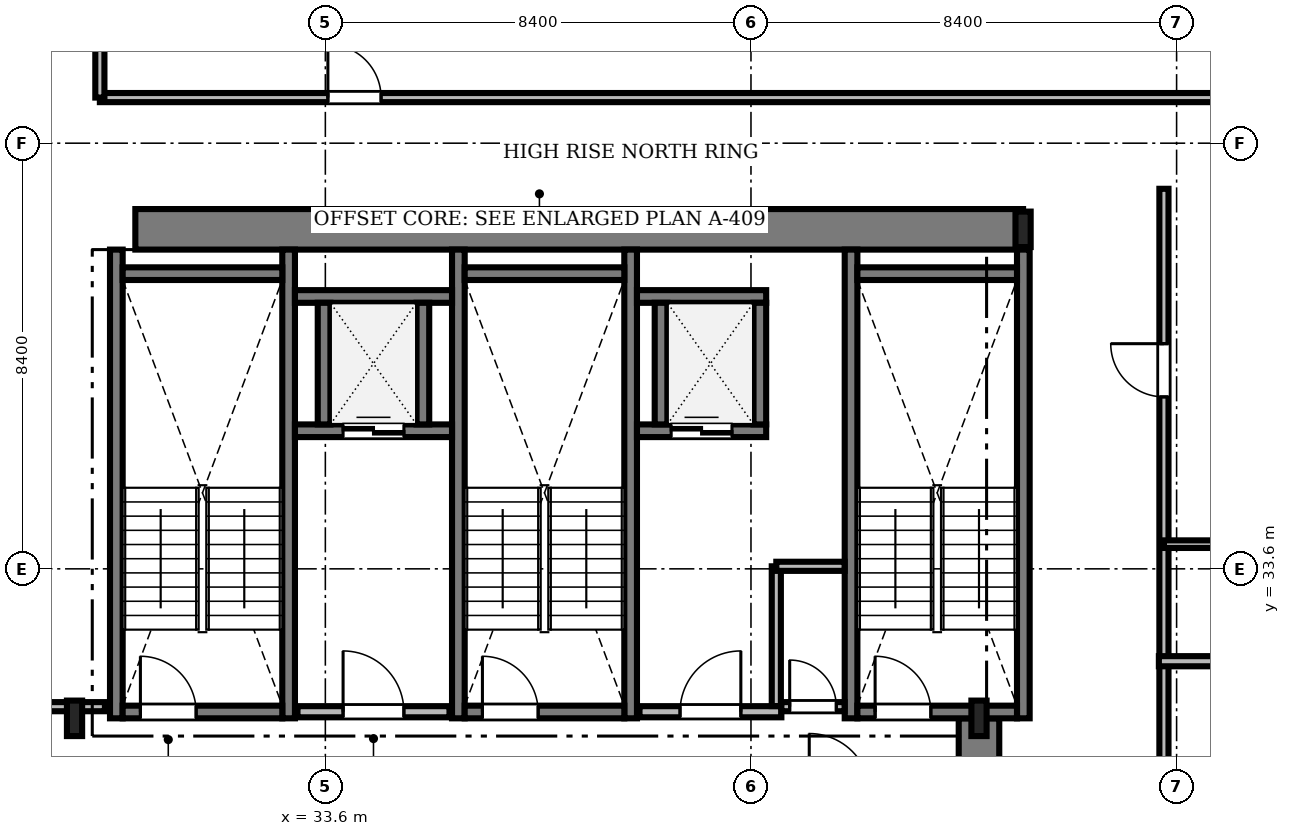
"""IFC4 building model, lengths in metres.
Left out: names, types, materials, properties, quantities, classifications, styles, units other than length and angle.
Written with IfcOpenShell. Run it as: python <this file> out.ifc"""

import sys

from ifc_helpers import new_model, si_unit, direction, frame, frame_2d, origin, origin_2d, place, context, subcontext, project, spatial, rectangle, i_section, extrude, source, transform, mapped, element, fill, save


model = new_model("IFC4")
c1 = context("Model", 3, precision=1e-05, world=origin(), true_north=direction((0.0, 1.0)))
c2 = subcontext(c1, "Body", "Model", "MODEL_VIEW")
j1 = project(units=[si_unit("LENGTHUNIT", "METRE"), si_unit("PLANEANGLEUNIT", "RADIAN")], contexts=[c1])
p1 = place(None, origin())
s1 = spatial("IfcSite", under=j1, at=p1, CompositionType="ELEMENT")
p2 = place(p1, origin())
s2 = spatial("IfcBuilding", under=s1, at=p2, CompositionType="ELEMENT")
p3 = place(p2, frame((0.0, 0.0, 233.55)))
s3 = spatial("IfcBuildingStorey", under=s2, at=p3, CompositionType="ELEMENT", Elevation=233.55)
m1 = source(origin(), c2, "Body", "SweptSolid", [
    extrude(rectangle(XDim=17.52, YDim=0.8, at=frame_2d((8.76, 0.0))), origin(), (0.0, 0.0, 1.0), 3.1),
])
p4 = place(p3, frame((29.85, 40.3, 0.0), z_axis=(0.0, 0.0, 1.0), x_axis=(1.0, 0.0, 0.0)))
e1 = element("IfcWall", 1, at=p4, inside=s3, PredefinedType="SHEAR", context=c2, shape_type="MappedRepresentation", body=[
    mapped(m1, transform((0.0, 0.0, 0.0), scale=1.0)),
])
m2 = source(origin(), c2, "Body", "SweptSolid", [
    extrude(rectangle(XDim=13.15, YDim=0.8, at=frame_2d((6.575, 0.0))), origin(), (0.0, 0.0, 1.0), 3.1),
])
p5 = place(p3, frame((46.5, 17.5, 0.0), z_axis=(0.0, 0.0, 1.0), x_axis=(0.0, 1.0, 0.0)))
e2 = element("IfcWall", 2, at=p5, inside=s3, PredefinedType="SHEAR", context=c2, shape_type="MappedRepresentation", body=[
    mapped(m2, transform((0.0, 0.0, 0.0), scale=1.0)),
])
m3 = source(origin(), c2, "Body", "SweptSolid", [
    extrude(i_section(OverallWidth=0.3, OverallDepth=0.7, WebThickness=0.017, FlangeThickness=0.032, FilletRadius=0.027, at=origin_2d()), origin(), (0.0, 0.0, 1.0), 3.1),
])
for number, where, z_axis, x_axis in (
    (3, (28.65, 30.65, 0.0), (0.0, 0.0, 1.0), (1.0, 0.0, 0.0)),
    (4, (46.5, 30.65, 0.0), (0.0, 0.0, 1.0), (1.0, 0.0, 0.0)),
    (5, (47.37, 40.3, 0.0), (0.0, 0.0, 1.0), (1.0, 0.0, 0.0)),
):
    element("IfcColumn", number, at=place(p3, frame(where, z_axis=z_axis, x_axis=x_axis)), inside=s3, PredefinedType="COLUMN", context=c2, shape_type="MappedRepresentation", body=[
        mapped(m3, transform((0.0, 0.0, 0.0), scale=1.0)),
    ])
m4 = source(origin(), c2, "Body", "SweptSolid", [
    extrude(rectangle(XDim=9.25, YDim=0.25, at=frame_2d((4.625, 0.0))), origin(), (0.0, 0.0, 1.0), 3.55),
])
for number, where, z_axis, x_axis in (
    (6, (29.475, 30.65, 0.0), (0.0, 0.0, 1.0), (0.0, 1.0, 0.0)),
    (7, (32.875, 30.65, 0.0), (0.0, 0.0, 1.0), (0.0, 1.0, 0.0)),
):
    element("IfcWall", number, at=place(p3, frame(where, z_axis=z_axis, x_axis=x_axis)), inside=s3, PredefinedType="SOLIDWALL", context=c2, shape_type="MappedRepresentation", body=[
        mapped(m4, transform((0.0, 0.0, 0.0), scale=1.0)),
    ])
m5 = source(origin(), c2, "Body", "SweptSolid", [
    extrude(rectangle(XDim=3.15, YDim=0.25, at=frame_2d((1.575, 0.0))), origin(), (0.0, 0.0, 1.0), 3.55),
])
p6 = place(p3, frame((29.6, 39.425, 0.0), z_axis=(0.0, 0.0, 1.0), x_axis=(1.0, 0.0, 0.0)))
e8 = element("IfcWall", 8, at=p6, inside=s3, PredefinedType="SOLIDWALL", context=c2, shape_type="MappedRepresentation", body=[
    mapped(m5, transform((0.0, 0.0, 0.0), scale=1.0)),
])
p7 = place(p3, frame((29.6, 30.775, 0.0), z_axis=(0.0, 0.0, 1.0), x_axis=(1.0, 0.0, 0.0)))
e9 = element("IfcWall", 9, at=p7, inside=s3, PredefinedType="SOLIDWALL", context=c2, shape_type="MappedRepresentation", body=[
    mapped(m5, transform((0.0, 0.0, 0.0), scale=1.0)),
])
m6 = source(origin(), c2, "Body", "SweptSolid", [
    extrude(rectangle(XDim=1.1, YDim=2.2, at=frame_2d((0.55, 1.1))), frame((0.0, 0.135, 0.0), z_axis=(0.0, -1.0, 0.0), x_axis=(1.0, 0.0, 0.0)), (0.0, 0.0, 1.0), 0.27),
])
p8 = place(p7, frame((0.35, 0.0, 0.0)))
e10 = element("IfcOpeningElement", 10, at=p8, cuts=e9, PredefinedType="OPENING", context=c2, shape_type="MappedRepresentation", body=[
    mapped(m6, transform((0.0, 0.0, 0.0), scale=1.0)),
])
for number, where, z_axis, x_axis in (
    (11, (36.225, 30.65, 0.0), (0.0, 0.0, 1.0), (0.0, 1.0, 0.0)),
    (12, (39.625, 30.65, 0.0), (0.0, 0.0, 1.0), (0.0, 1.0, 0.0)),
):
    element("IfcWall", number, at=place(p3, frame(where, z_axis=z_axis, x_axis=x_axis)), inside=s3, PredefinedType="SOLIDWALL", context=c2, shape_type="MappedRepresentation", body=[
        mapped(m4, transform((0.0, 0.0, 0.0), scale=1.0)),
    ])
p9 = place(p3, frame((36.35, 39.425, 0.0), z_axis=(0.0, 0.0, 1.0), x_axis=(1.0, 0.0, 0.0)))
e13 = element("IfcWall", 13, at=p9, inside=s3, PredefinedType="SOLIDWALL", context=c2, shape_type="MappedRepresentation", body=[
    mapped(m5, transform((0.0, 0.0, 0.0), scale=1.0)),
])
p10 = place(p3, frame((36.35, 30.775, 0.0), z_axis=(0.0, 0.0, 1.0), x_axis=(1.0, 0.0, 0.0)))
e14 = element("IfcWall", 14, at=p10, inside=s3, PredefinedType="SOLIDWALL", context=c2, shape_type="MappedRepresentation", body=[
    mapped(m5, transform((0.0, 0.0, 0.0), scale=1.0)),
])
p11 = place(p10, frame((0.35, 0.0, 0.0)))
e15 = element("IfcOpeningElement", 15, at=p11, cuts=e14, PredefinedType="OPENING", context=c2, shape_type="MappedRepresentation", body=[
    mapped(m6, transform((0.0, 0.0, 0.0), scale=1.0)),
])
for number, where, z_axis, x_axis in (
    (16, (43.975, 30.65, 0.0), (0.0, 0.0, 1.0), (0.0, 1.0, 0.0)),
    (17, (47.375, 30.65, 0.0), (0.0, 0.0, 1.0), (0.0, 1.0, 0.0)),
):
    element("IfcWall", number, at=place(p3, frame(where, z_axis=z_axis, x_axis=x_axis)), inside=s3, PredefinedType="SOLIDWALL", context=c2, shape_type="MappedRepresentation", body=[
        mapped(m4, transform((0.0, 0.0, 0.0), scale=1.0)),
    ])
p12 = place(p3, frame((44.1, 39.425, 0.0), z_axis=(0.0, 0.0, 1.0), x_axis=(1.0, 0.0, 0.0)))
e18 = element("IfcWall", 18, at=p12, inside=s3, PredefinedType="SOLIDWALL", context=c2, shape_type="MappedRepresentation", body=[
    mapped(m5, transform((0.0, 0.0, 0.0), scale=1.0)),
])
p13 = place(p3, frame((44.1, 30.775, 0.0), z_axis=(0.0, 0.0, 1.0), x_axis=(1.0, 0.0, 0.0)))
e19 = element("IfcWall", 19, at=p13, inside=s3, PredefinedType="SOLIDWALL", context=c2, shape_type="MappedRepresentation", body=[
    mapped(m5, transform((0.0, 0.0, 0.0), scale=1.0)),
])
p14 = place(p13, frame((0.35, 0.0, 0.0)))
e20 = element("IfcOpeningElement", 20, at=p14, cuts=e19, PredefinedType="OPENING", context=c2, shape_type="MappedRepresentation", body=[
    mapped(m6, transform((0.0, 0.0, 0.0), scale=1.0)),
])
m7 = source(origin(), c2, "Body", "SweptSolid", [
    extrude(rectangle(XDim=3.0, YDim=0.22, at=frame_2d((1.5, 0.0))), origin(), (0.0, 0.0, 1.0), 3.1),
])
p15 = place(p3, frame((33.05, 30.78, 0.0), z_axis=(0.0, 0.0, 1.0), x_axis=(1.0, 0.0, 0.0)))
e21 = element("IfcWall", 21, at=p15, inside=s3, PredefinedType="SOLIDWALL", context=c2, shape_type="MappedRepresentation", body=[
    mapped(m7, transform((0.0, 0.0, 0.0), scale=1.0)),
])
m8 = source(origin(), c2, "Body", "SweptSolid", [
    extrude(rectangle(XDim=1.2, YDim=2.2, at=frame_2d((0.6, 1.1))), frame((0.0, 0.12, 0.0), z_axis=(0.0, -1.0, 0.0), x_axis=(1.0, 0.0, 0.0)), (0.0, 0.0, 1.0), 0.24),
])
p16 = place(p15, frame((0.9, 0.0, 0.0)))
e22 = element("IfcOpeningElement", 22, at=p16, cuts=e21, PredefinedType="OPENING", context=c2, shape_type="MappedRepresentation", body=[
    mapped(m8, transform((0.0, 0.0, 0.0), scale=1.0)),
])
m9 = source(origin(), c2, "Body", "SweptSolid", [
    extrude(rectangle(XDim=2.8, YDim=0.22, at=frame_2d((1.4, 0.0))), origin(), (0.0, 0.0, 1.0), 3.1),
])
p17 = place(p3, frame((39.8, 30.78, 0.0), z_axis=(0.0, 0.0, 1.0), x_axis=(1.0, 0.0, 0.0)))
e23 = element("IfcWall", 23, at=p17, inside=s3, PredefinedType="SOLIDWALL", context=c2, shape_type="MappedRepresentation", body=[
    mapped(m9, transform((0.0, 0.0, 0.0), scale=1.0)),
])
p18 = place(p17, frame((0.8, 0.0, 0.0)))
e24 = element("IfcOpeningElement", 24, at=p18, cuts=e23, PredefinedType="OPENING", context=c2, shape_type="MappedRepresentation", body=[
    mapped(m8, transform((0.0, 0.0, 0.0), scale=1.0)),
])
m10 = source(origin(), c2, "Body", "SweptSolid", [
    extrude(rectangle(XDim=3.1, YDim=0.25, at=frame_2d((1.55, 0.0))), origin(), (0.0, 0.0, 1.0), 3.1),
])
p19 = place(p3, frame((33.0, 36.325, 0.0), z_axis=(0.0, 0.0, 1.0), x_axis=(1.0, 0.0, 0.0)))
e25 = element("IfcWall", 25, at=p19, inside=s3, PredefinedType="SOLIDWALL", context=c2, shape_type="MappedRepresentation", body=[
    mapped(m10, transform((0.0, 0.0, 0.0), scale=1.0)),
])
m11 = source(origin(), c2, "Body", "SweptSolid", [
    extrude(rectangle(XDim=1.2, YDim=2.25, at=frame_2d((0.6, 1.125))), frame((0.0, 0.135, 0.0), z_axis=(0.0, -1.0, 0.0), x_axis=(1.0, 0.0, 0.0)), (0.0, 0.0, 1.0), 0.27),
])
p20 = place(p19, frame((0.95, 0.0, 0.0)))
e26 = element("IfcOpeningElement", 26, at=p20, cuts=e25, PredefinedType="OPENING", context=c2, shape_type="MappedRepresentation", body=[
    mapped(m11, transform((0.0, 0.0, 0.0), scale=1.0)),
])
p21 = place(p3, frame((33.0, 38.975, 0.0), z_axis=(0.0, 0.0, 1.0), x_axis=(1.0, 0.0, 0.0)))
e27 = element("IfcWall", 27, at=p21, inside=s3, PredefinedType="SOLIDWALL", context=c2, shape_type="MappedRepresentation", body=[
    mapped(m10, transform((0.0, 0.0, 0.0), scale=1.0)),
])
m12 = source(origin(), c2, "Body", "SweptSolid", [
    extrude(rectangle(XDim=2.4, YDim=0.25, at=frame_2d((1.2, 0.0))), origin(), (0.0, 0.0, 1.0), 3.1),
])
for number, where, z_axis, x_axis in (
    (28, (33.575, 36.45, 0.0), (0.0, 0.0, 1.0), (0.0, 1.0, 0.0)),
    (29, (35.525, 36.45, 0.0), (0.0, 0.0, 1.0), (0.0, 1.0, 0.0)),
):
    element("IfcWall", number, at=place(p3, frame(where, z_axis=z_axis, x_axis=x_axis)), inside=s3, PredefinedType="SOLIDWALL", context=c2, shape_type="MappedRepresentation", body=[
        mapped(m12, transform((0.0, 0.0, 0.0), scale=1.0)),
    ])
m13 = source(origin(), c2, "Body", "SweptSolid", [
    extrude(rectangle(XDim=2.55, YDim=0.25, at=frame_2d((1.275, 0.0))), origin(), (0.0, 0.0, 1.0), 3.1),
])
p22 = place(p3, frame((39.75, 36.325, 0.0), z_axis=(0.0, 0.0, 1.0), x_axis=(1.0, 0.0, 0.0)))
e30 = element("IfcWall", 30, at=p22, inside=s3, PredefinedType="SOLIDWALL", context=c2, shape_type="MappedRepresentation", body=[
    mapped(m13, transform((0.0, 0.0, 0.0), scale=1.0)),
])
p23 = place(p22, frame((0.675, 0.0, 0.0)))
e31 = element("IfcOpeningElement", 31, at=p23, cuts=e30, PredefinedType="OPENING", context=c2, shape_type="MappedRepresentation", body=[
    mapped(m11, transform((0.0, 0.0, 0.0), scale=1.0)),
])
p24 = place(p3, frame((39.75, 38.975, 0.0), z_axis=(0.0, 0.0, 1.0), x_axis=(1.0, 0.0, 0.0)))
e32 = element("IfcWall", 32, at=p24, inside=s3, PredefinedType="SOLIDWALL", context=c2, shape_type="MappedRepresentation", body=[
    mapped(m13, transform((0.0, 0.0, 0.0), scale=1.0)),
])
for number, where, z_axis, x_axis in (
    (33, (40.225, 36.45, 0.0), (0.0, 0.0, 1.0), (0.0, 1.0, 0.0)),
    (34, (42.175, 36.45, 0.0), (0.0, 0.0, 1.0), (0.0, 1.0, 0.0)),
):
    element("IfcWall", number, at=place(p3, frame(where, z_axis=z_axis, x_axis=x_axis)), inside=s3, PredefinedType="SOLIDWALL", context=c2, shape_type="MappedRepresentation", body=[
        mapped(m12, transform((0.0, 0.0, 0.0), scale=1.0)),
    ])
m14 = source(origin(), c2, "Body", "SweptSolid", [
    extrude(rectangle(XDim=28.428, YDim=0.18, at=frame_2d((14.214, 0.0))), origin(), (0.0, 0.0, 1.0), 2.376),
])
p25 = place(p3, frame((29.15, 42.9, 0.0), z_axis=(0.0, 0.0, 1.0), x_axis=(1.0, 0.0, 0.0)))
e35 = element("IfcWall", 35, at=p25, inside=s3, PredefinedType="PARTITIONING", context=c2, shape_type="MappedRepresentation", body=[
    mapped(m14, transform((0.0, 0.0, 0.0), scale=1.0)),
])
m15 = source(origin(), c2, "Body", "SweptSolid", [
    extrude(rectangle(XDim=1.05, YDim=2.2, at=frame_2d((0.525, 1.1))), frame((0.0, 0.1, 0.0), z_axis=(0.0, -1.0, 0.0), x_axis=(1.0, 0.0, 0.0)), (0.0, 0.0, 1.0), 0.2),
])
p26 = place(p25, frame((4.5, 0.0, 0.0)))
e36 = element("IfcOpeningElement", 36, at=p26, cuts=e35, PredefinedType="OPENING", context=c2, shape_type="MappedRepresentation", body=[
    mapped(m15, transform((0.0, 0.0, 0.0), scale=1.0)),
])
m16 = source(origin(), c2, "Body", "SweptSolid", [
    extrude(rectangle(XDim=27.53, YDim=0.18, at=frame_2d((13.765, 0.0))), origin(), (0.0, 0.0, 1.0), 2.542),
])
p27 = place(p3, frame((50.15, 13.57, 0.0), z_axis=(0.0, 0.0, 1.0), x_axis=(0.0, 1.0, 0.0)))
e37 = element("IfcWall", 37, at=p27, inside=s3, PredefinedType="PARTITIONING", context=c2, shape_type="MappedRepresentation", body=[
    mapped(m16, transform((0.0, 0.0, 0.0), scale=1.0)),
])
p28 = place(p27, frame((5.217, 0.0, 0.0)))
e38 = element("IfcOpeningElement", 38, at=p28, cuts=e37, PredefinedType="OPENING", context=c2, shape_type="MappedRepresentation", body=[
    mapped(m15, transform((0.0, 0.0, 0.0), scale=1.0)),
])
p29 = place(p27, frame((14.32, 0.0, 0.0)))
e39 = element("IfcOpeningElement", 39, at=p29, cuts=e37, PredefinedType="OPENING", context=c2, shape_type="MappedRepresentation", body=[
    mapped(m15, transform((0.0, 0.0, 0.0), scale=1.0)),
])
p30 = place(p27, frame((23.423, 0.0, 0.0)))
e40 = element("IfcOpeningElement", 40, at=p30, cuts=e37, PredefinedType="OPENING", context=c2, shape_type="MappedRepresentation", body=[
    mapped(m15, transform((0.0, 0.0, 0.0), scale=1.0)),
])
m17 = source(origin(), c2, "Body", "SweptSolid", [
    extrude(rectangle(XDim=17.828, YDim=0.18, at=frame_2d((8.914, 0.0))), origin(), (0.0, 0.0, 1.0), 2.376),
])
p31 = place(p3, frame((11.422, 30.88, 0.0), z_axis=(0.0, 0.0, 1.0), x_axis=(1.0, 0.0, 0.0)))
e41 = element("IfcWall", 41, at=p31, inside=s3, PredefinedType="PARTITIONING", context=c2, shape_type="MappedRepresentation", body=[
    mapped(m17, transform((0.0, 0.0, 0.0), scale=1.0)),
])
p32 = place(p31, frame((10.778, 0.0, 0.0)))
e42 = element("IfcOpeningElement", 42, at=p32, cuts=e41, PredefinedType="OPENING", context=c2, shape_type="MappedRepresentation", body=[
    mapped(m15, transform((0.0, 0.0, 0.0), scale=1.0)),
])
m18 = source(origin(), c2, "Body", "SweptSolid", [
    extrude(rectangle(XDim=1.248, YDim=0.18, at=frame_2d((0.624, 0.0))), origin(), (0.0, 0.0, 1.0), 3.1),
])
p33 = place(p3, frame((42.6, 30.88, 0.0), z_axis=(0.0, 0.0, 1.0), x_axis=(1.0, 0.0, 0.0)))
e43 = element("IfcWall", 43, at=p33, inside=s3, PredefinedType="PARTITIONING", context=c2, shape_type="MappedRepresentation", body=[
    mapped(m18, transform((0.0, 0.0, 0.0), scale=1.0)),
])
m19 = source(origin(), c2, "Body", "SweptSolid", [
    extrude(rectangle(XDim=0.92, YDim=2.1, at=frame_2d((0.46, 1.05))), frame((0.0, 0.1, 0.0), z_axis=(0.0, -1.0, 0.0), x_axis=(1.0, 0.0, 0.0)), (0.0, 0.0, 1.0), 0.2),
])
p34 = place(p33, frame((0.164, 0.0, 0.0)))
e44 = element("IfcOpeningElement", 44, at=p34, cuts=e43, PredefinedType="OPENING", context=c2, shape_type="MappedRepresentation", body=[
    mapped(m19, transform((0.0, 0.0, 0.0), scale=1.0)),
])
m20 = source(origin(), c2, "Body", "SweptSolid", [
    extrude(rectangle(XDim=7.528, YDim=0.2, at=frame_2d((3.764, 0.0))), origin(), (0.0, 0.0, 1.0), 2.376),
])
p35 = place(p3, frame((50.05, 31.777, 0.0), z_axis=(0.0, 0.0, 1.0), x_axis=(1.0, 0.0, 0.0)))
e45 = element("IfcWall", 45, at=p35, inside=s3, PredefinedType="PARTITIONING", context=c2, shape_type="MappedRepresentation", body=[
    mapped(m20, transform((0.0, 0.0, 0.0), scale=1.0)),
])
m21 = source(origin(), c2, "Body", "SweptSolid", [
    extrude(rectangle(XDim=5.378, YDim=0.18, at=frame_2d((2.689, 0.0))), origin(), (0.0, 0.0, 1.0), 2.376),
])
p36 = place(p3, frame((29.15, 42.9, 0.0), z_axis=(0.0, 0.0, 1.0), x_axis=(0.0, 1.0, 0.0)))
e46 = element("IfcWall", 46, at=p36, inside=s3, PredefinedType="PARTITIONING", context=c2, shape_type="MappedRepresentation", body=[
    mapped(m21, transform((0.0, 0.0, 0.0), scale=1.0)),
])
m22 = source(origin(), c2, "Body", "SweptSolid", [
    extrude(rectangle(XDim=2.758, YDim=0.18, at=frame_2d((1.379, 0.0))), origin(), (0.0, 0.0, 1.0), 3.1),
])
p37 = place(p3, frame((42.5, 30.892, 0.0), z_axis=(0.0, 0.0, 1.0), x_axis=(0.0, 1.0, 0.0)))
e47 = element("IfcWall", 47, at=p37, inside=s3, PredefinedType="PARTITIONING", context=c2, shape_type="MappedRepresentation", body=[
    mapped(m22, transform((0.0, 0.0, 0.0), scale=1.0)),
])
m23 = source(origin(), c2, "Body", "SweptSolid", [
    extrude(rectangle(XDim=2.36, YDim=0.15, at=frame_2d((1.18, 0.0))), origin(), (0.0, 0.0, 1.0), 3.1),
])
p38 = place(p3, frame((50.15, 34.087, 0.0), z_axis=(0.0, 0.0, 1.0), x_axis=(1.0, 0.0, 0.0)))
e48 = element("IfcWall", 48, at=p38, inside=s3, PredefinedType="PARTITIONING", context=c2, shape_type="MappedRepresentation", body=[
    mapped(m23, transform((0.0, 0.0, 0.0), scale=1.0)),
])
m24 = source(origin(), c2, "Body", "SweptSolid", [
    extrude(rectangle(XDim=1.348, YDim=0.18, at=frame_2d((0.674, 0.0))), origin(), (0.0, 0.0, 1.0), 3.1),
])
p39 = place(p3, frame((42.5, 33.65, 0.0), z_axis=(0.0, 0.0, 1.0), x_axis=(1.0, 0.0, 0.0)))
e49 = element("IfcWall", 49, at=p39, inside=s3, PredefinedType="PARTITIONING", context=c2, shape_type="MappedRepresentation", body=[
    mapped(m24, transform((0.0, 0.0, 0.0), scale=1.0)),
])
m25 = source(origin(), c2, "Body", "SweptSolid", [
    extrude(rectangle(XDim=1.1, YDim=2.2, at=frame_2d((0.55, 1.1))), frame((0.0, 0.025, 0.0), z_axis=(0.0, -1.0, 0.0), x_axis=(1.0, 0.0, 0.0)), (0.0, 0.0, 1.0), 0.05),
])
p40 = place(p8, origin())
e50 = element("IfcDoor", 50, at=p40, inside=s3, OperationType="SINGLE_SWING_LEFT", PredefinedType="DOOR", context=c2, shape_type="MappedRepresentation", body=[
    mapped(m25, transform((0.0, 0.0, 0.0), scale=1.0)),
])
fill(e10, e50)
p41 = place(p11, origin())
e51 = element("IfcDoor", 51, at=p41, inside=s3, OperationType="SINGLE_SWING_LEFT", PredefinedType="DOOR", context=c2, shape_type="MappedRepresentation", body=[
    mapped(m25, transform((0.0, 0.0, 0.0), scale=1.0)),
])
fill(e15, e51)
p42 = place(p14, origin())
e52 = element("IfcDoor", 52, at=p42, inside=s3, OperationType="SINGLE_SWING_LEFT", PredefinedType="DOOR", context=c2, shape_type="MappedRepresentation", body=[
    mapped(m25, transform((0.0, 0.0, 0.0), scale=1.0)),
])
fill(e20, e52)
m26 = source(origin(), c2, "Body", "SweptSolid", [
    extrude(rectangle(XDim=1.2, YDim=2.2, at=frame_2d((0.6, 1.1))), frame((0.0, 0.025, 0.0), z_axis=(0.0, -1.0, 0.0), x_axis=(1.0, 0.0, 0.0)), (0.0, 0.0, 1.0), 0.05),
])
p43 = place(p16, origin())
e53 = element("IfcDoor", 53, at=p43, inside=s3, OperationType="SINGLE_SWING_LEFT", PredefinedType="DOOR", context=c2, shape_type="MappedRepresentation", body=[
    mapped(m26, transform((0.0, 0.0, 0.0), scale=1.0)),
])
fill(e22, e53)
p44 = place(p18, origin())
e54 = element("IfcDoor", 54, at=p44, inside=s3, OperationType="SINGLE_SWING_RIGHT", PredefinedType="DOOR", context=c2, shape_type="MappedRepresentation", body=[
    mapped(m26, transform((0.0, 0.0, 0.0), scale=1.0)),
])
fill(e24, e54)
m27 = source(origin(), c2, "Body", "SweptSolid", [
    extrude(rectangle(XDim=1.2, YDim=2.25, at=frame_2d((0.6, 1.125))), frame((0.0, 0.025, 0.0), z_axis=(0.0, -1.0, 0.0), x_axis=(1.0, 0.0, 0.0)), (0.0, 0.0, 1.0), 0.05),
])
p45 = place(p20, origin())
e55 = element("IfcDoor", 55, at=p45, inside=s3, OperationType="DOUBLE_DOOR_SLIDING", PredefinedType="DOOR", context=c2, shape_type="MappedRepresentation", body=[
    mapped(m27, transform((0.0, 0.0, 0.0), scale=1.0)),
])
fill(e26, e55)
p46 = place(p23, origin())
e56 = element("IfcDoor", 56, at=p46, inside=s3, OperationType="DOUBLE_DOOR_SLIDING", PredefinedType="DOOR", context=c2, shape_type="MappedRepresentation", body=[
    mapped(m27, transform((0.0, 0.0, 0.0), scale=1.0)),
])
fill(e31, e56)
m28 = source(origin(), c2, "Body", "SweptSolid", [
    extrude(rectangle(XDim=1.05, YDim=2.2, at=frame_2d((0.525, 1.1))), frame((0.0, 0.025, 0.0), z_axis=(0.0, -1.0, 0.0), x_axis=(1.0, 0.0, 0.0)), (0.0, 0.0, 1.0), 0.05),
])
p47 = place(p26, origin())
e57 = element("IfcDoor", 57, at=p47, inside=s3, OperationType="SINGLE_SWING_LEFT", PredefinedType="DOOR", context=c2, shape_type="MappedRepresentation", body=[
    mapped(m28, transform((0.0, 0.0, 0.0), scale=1.0)),
])
fill(e36, e57)
p48 = place(p30, origin())
e58 = element("IfcDoor", 58, at=p48, inside=s3, OperationType="SINGLE_SWING_RIGHT", PredefinedType="DOOR", context=c2, shape_type="MappedRepresentation", body=[
    mapped(m28, transform((0.0, 0.0, 0.0), scale=1.0)),
])
fill(e40, e58)
m29 = source(origin(), c2, "Body", "SweptSolid", [
    extrude(rectangle(XDim=0.92, YDim=2.1, at=frame_2d((0.46, 1.05))), frame((0.0, 0.025, 0.0), z_axis=(0.0, -1.0, 0.0), x_axis=(1.0, 0.0, 0.0)), (0.0, 0.0, 1.0), 0.05),
])
p49 = place(p34, origin())
e59 = element("IfcDoor", 59, at=p49, inside=s3, OperationType="SINGLE_SWING_LEFT", PredefinedType="DOOR", context=c2, shape_type="MappedRepresentation", body=[
    mapped(m29, transform((0.0, 0.0, 0.0), scale=1.0)),
])
fill(e44, e59)
save(model, sys.argv[1])
